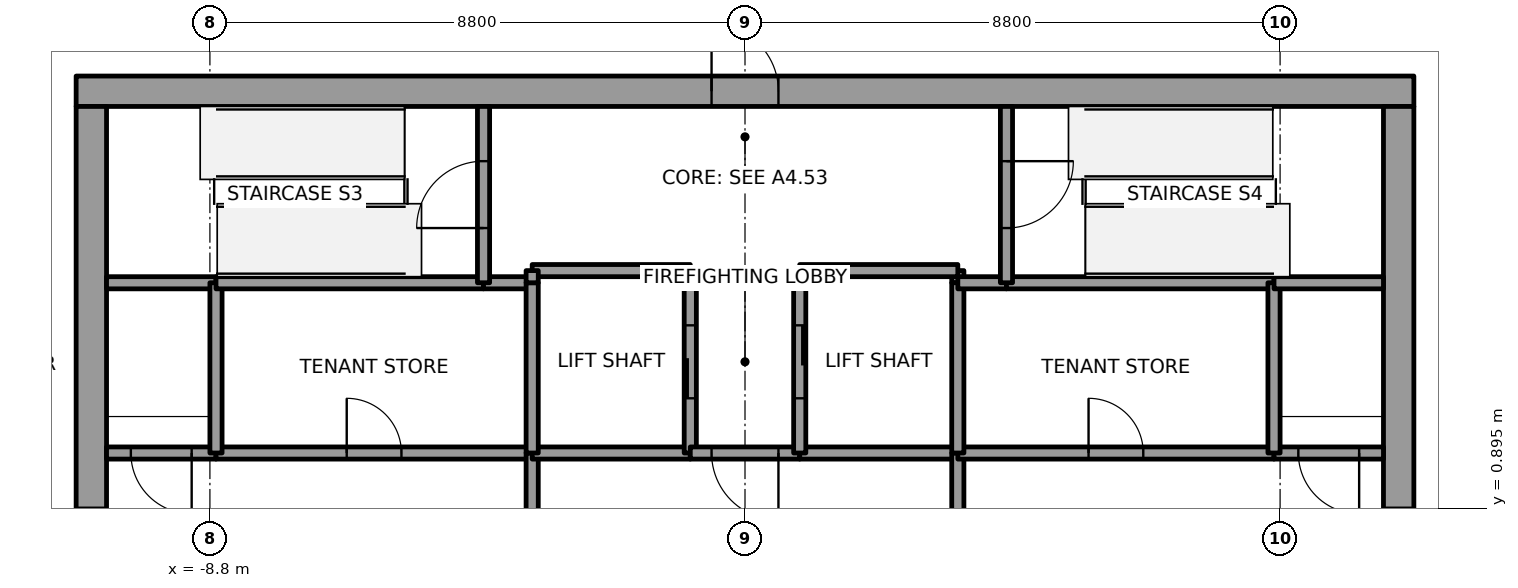
"""IFC4 building model, lengths in metres.
Left out: names, types, materials, properties, quantities, classifications, styles, units other than length and angle.
Written with IfcOpenShell. Run it as: python <this file> out.ifc"""

import sys

from ifc_helpers import new_model, si_unit, direction, frame, frame_2d, origin, place, context, subcontext, project, spatial, rectangle, extrude, element, fill, save


model = new_model("IFC4")
c1 = context("Model", 3, precision=1e-05, world=origin(), true_north=direction((0.0, 1.0)))
c2 = subcontext(c1, "Body", "Model", "MODEL_VIEW")
j1 = project(units=[si_unit("LENGTHUNIT", "METRE"), si_unit("PLANEANGLEUNIT", "RADIAN")], contexts=[c1])
p1 = place(None, origin())
s1 = spatial("IfcSite", under=j1, at=p1, CompositionType="ELEMENT")
p2 = place(p1, origin())
s2 = spatial("IfcBuilding", under=s1, at=p2, CompositionType="ELEMENT")
p3 = place(p2, frame((0.0, 0.0, 231.0)))
s3 = spatial("IfcBuildingStorey", under=s2, at=p3, CompositionType="ELEMENT", Elevation=231.0)
p4 = place(p3, frame((-11.0, 7.75, 0.0), z_axis=(0.0, 0.0, 1.0), x_axis=(1.0, 0.0, 0.0)))
e1 = element("IfcWall", 1, at=p4, inside=s3, PredefinedType="SHEAR", context=c2, shape_type="SweptSolid", body=[
    extrude(rectangle(XDim=22.0, YDim=0.5, at=frame_2d((11.0, 0.0))), origin(), (0.0, 0.0, 1.0), 4.0),
])
p5 = place(p4, frame((10.45, 0.0, 0.0)))
e2 = element("IfcOpeningElement", 2, at=p5, cuts=e1, PredefinedType="OPENING", context=c2, shape_type="SweptSolid", body=[
    extrude(rectangle(XDim=1.1, YDim=2.1, at=frame_2d((0.55, 1.05))), frame((0.0, 0.25, 0.0), z_axis=(0.0, -1.0, 0.0), x_axis=(1.0, 0.0, 0.0)), (0.0, 0.0, 1.0), 0.5),
])
p6 = place(p3, frame((-10.75, -7.5, 0.0), z_axis=(0.0, 0.0, 1.0), x_axis=(0.0, 1.0, 0.0)))
e3 = element("IfcWall", 3, at=p6, inside=s3, PredefinedType="SHEAR", context=c2, shape_type="SweptSolid", body=[
    extrude(rectangle(XDim=15.0, YDim=0.5, at=frame_2d((7.5, 0.0))), origin(), (0.0, 0.0, 1.0), 4.0),
])
p7 = place(p6, frame((6.6, 0.0, 0.0)))
e4 = element("IfcOpeningElement", 4, at=p7, cuts=e3, PredefinedType="OPENING", context=c2, shape_type="SweptSolid", body=[
    extrude(rectangle(XDim=1.8, YDim=2.1, at=frame_2d((0.9, 1.05))), frame((0.0, 0.25, 0.0), z_axis=(0.0, -1.0, 0.0), x_axis=(1.0, 0.0, 0.0)), (0.0, 0.0, 1.0), 0.5),
])
p8 = place(p3, frame((10.75, -7.5, 0.0), z_axis=(0.0, 0.0, 1.0), x_axis=(0.0, 1.0, 0.0)))
e5 = element("IfcWall", 5, at=p8, inside=s3, PredefinedType="SHEAR", context=c2, shape_type="SweptSolid", body=[
    extrude(rectangle(XDim=15.0, YDim=0.5, at=frame_2d((7.5, 0.0))), origin(), (0.0, 0.0, 1.0), 4.0),
])
p9 = place(p8, frame((6.6, 0.0, 0.0)))
e6 = element("IfcOpeningElement", 6, at=p9, cuts=e5, PredefinedType="OPENING", context=c2, shape_type="SweptSolid", body=[
    extrude(rectangle(XDim=1.8, YDim=2.1, at=frame_2d((0.9, 1.05))), frame((0.0, 0.25, 0.0), z_axis=(0.0, -1.0, 0.0), x_axis=(1.0, 0.0, 0.0)), (0.0, 0.0, 1.0), 0.5),
])
p10 = place(p3, frame((-8.7, 1.8, 0.0), z_axis=(0.0, 0.0, 1.0), x_axis=(-1.0, 0.0, 0.0)))
e7 = element("IfcWall", 7, at=p10, inside=s3, PredefinedType="SOLIDWALL", context=c2, shape_type="SweptSolid", body=[
    extrude(rectangle(XDim=1.8, YDim=0.2, at=frame_2d((0.9, 0.0))), origin(), (0.0, 0.0, 1.0), 3.85),
])
p11 = place(p10, frame((0.4, 0.0, 0.0)))
e8 = element("IfcOpeningElement", 8, at=p11, cuts=e7, PredefinedType="OPENING", context=c2, shape_type="SweptSolid", body=[
    extrude(rectangle(XDim=1.0, YDim=2.1, at=frame_2d((0.5, 1.05))), frame((0.0, 0.1, 0.0), z_axis=(0.0, -1.0, 0.0), x_axis=(1.0, 0.0, 0.0)), (0.0, 0.0, 1.0), 0.2),
])
p12 = place(p3, frame((-8.7, 4.6, 0.0), z_axis=(0.0, 0.0, 1.0), x_axis=(-1.0, 0.0, 0.0)))
e9 = element("IfcWall", 9, at=p12, inside=s3, PredefinedType="SOLIDWALL", context=c2, shape_type="SweptSolid", body=[
    extrude(rectangle(XDim=1.8, YDim=0.2, at=frame_2d((0.9, 0.0))), origin(), (0.0, 0.0, 1.0), 3.85),
])
p13 = place(p3, frame((-8.7, 1.8, 0.0), z_axis=(0.0, 0.0, 1.0), x_axis=(1.0, 0.0, 0.0)))
e10 = element("IfcWall", 10, at=p13, inside=s3, PredefinedType="SOLIDWALL", context=c2, shape_type="SweptSolid", body=[
    extrude(rectangle(XDim=5.2, YDim=0.2, at=frame_2d((2.6, 0.0))), origin(), (0.0, 0.0, 1.0), 3.85),
])
p14 = place(p13, frame((2.15, 0.0, 0.0)))
e11 = element("IfcOpeningElement", 11, at=p14, cuts=e10, PredefinedType="OPENING", context=c2, shape_type="SweptSolid", body=[
    extrude(rectangle(XDim=0.9, YDim=2.1, at=frame_2d((0.45, 1.05))), frame((0.0, 0.1, 0.0), z_axis=(0.0, -1.0, 0.0), x_axis=(1.0, 0.0, 0.0)), (0.0, 0.0, 1.0), 0.2),
])
p15 = place(p3, frame((-8.7, 4.6, 0.0), z_axis=(0.0, 0.0, 1.0), x_axis=(0.0, -1.0, 0.0)))
e12 = element("IfcWall", 12, at=p15, inside=s3, PredefinedType="SOLIDWALL", context=c2, shape_type="SweptSolid", body=[
    extrude(rectangle(XDim=2.8, YDim=0.2, at=frame_2d((1.4, 0.0))), origin(), (0.0, 0.0, 1.0), 3.85),
])
p16 = place(p3, frame((-4.3, 4.6, 0.0), z_axis=(0.0, 0.0, 1.0), x_axis=(-1.0, 0.0, 0.0)))
e13 = element("IfcWall", 13, at=p16, inside=s3, PredefinedType="SOLIDWALL", context=c2, shape_type="SweptSolid", body=[
    extrude(rectangle(XDim=4.4, YDim=0.2, at=frame_2d((2.2, 0.0))), origin(), (0.0, 0.0, 1.0), 3.85),
])
p17 = place(p3, frame((-3.5, 4.6, 0.0), z_axis=(0.0, 0.0, 1.0), x_axis=(-1.0, 0.0, 0.0)))
e14 = element("IfcWall", 14, at=p17, inside=s3, PredefinedType="SOLIDWALL", context=c2, shape_type="SweptSolid", body=[
    extrude(rectangle(XDim=0.8, YDim=0.2, at=frame_2d((0.4, 0.0))), origin(), (0.0, 0.0, 1.0), 3.85),
])
p18 = place(p3, frame((-4.3, 4.6, 0.0), z_axis=(0.0, 0.0, 1.0), x_axis=(0.0, 1.0, 0.0)))
e15 = element("IfcWall", 15, at=p18, inside=s3, PredefinedType="SOLIDWALL", context=c2, shape_type="SweptSolid", body=[
    extrude(rectangle(XDim=2.9, YDim=0.2, at=frame_2d((1.45, 0.0))), origin(), (0.0, 0.0, 1.0), 3.85),
])
p19 = place(p18, frame((0.9, 0.0, 0.0)))
e16 = element("IfcOpeningElement", 16, at=p19, cuts=e15, PredefinedType="OPENING", context=c2, shape_type="SweptSolid", body=[
    extrude(rectangle(XDim=1.1, YDim=2.1, at=frame_2d((0.55, 1.05))), frame((0.0, 0.1, 0.0), z_axis=(0.0, -1.0, 0.0), x_axis=(1.0, 0.0, 0.0)), (0.0, 0.0, 1.0), 0.2),
])
p20 = place(p3, frame((-3.5, 1.8, 0.0), z_axis=(0.0, 0.0, 1.0), x_axis=(0.0, -1.0, 0.0)))
e17 = element("IfcWall", 17, at=p20, inside=s3, PredefinedType="SOLIDWALL", context=c2, shape_type="SweptSolid", body=[
    extrude(rectangle(XDim=3.6, YDim=0.2, at=frame_2d((1.8, 0.0))), origin(), (0.0, 0.0, 1.0), 3.85),
])
p21 = place(p20, frame((1.05, 0.0, 0.0)))
e18 = element("IfcOpeningElement", 18, at=p21, cuts=e17, PredefinedType="OPENING", context=c2, shape_type="SweptSolid", body=[
    extrude(rectangle(XDim=1.5, YDim=2.1, at=frame_2d((0.75, 1.05))), frame((0.0, 0.1, 0.0), z_axis=(0.0, -1.0, 0.0), x_axis=(1.0, 0.0, 0.0)), (0.0, 0.0, 1.0), 0.2),
])
p22 = place(p3, frame((-0.9, 1.8, 0.0), z_axis=(0.0, 0.0, 1.0), x_axis=(-1.0, 0.0, 0.0)))
e19 = element("IfcWall", 19, at=p22, inside=s3, PredefinedType="SOLIDWALL", context=c2, shape_type="SweptSolid", body=[
    extrude(rectangle(XDim=2.6, YDim=0.2, at=frame_2d((1.3, 0.0))), origin(), (0.0, 0.0, 1.0), 3.85),
])
p23 = place(p3, frame((-3.5, 1.8, 0.0), z_axis=(0.0, 0.0, 1.0), x_axis=(0.0, 1.0, 0.0)))
e20 = element("IfcWall", 20, at=p23, inside=s3, PredefinedType="SOLIDWALL", context=c2, shape_type="SweptSolid", body=[
    extrude(rectangle(XDim=2.8, YDim=0.2, at=frame_2d((1.4, 0.0))), origin(), (0.0, 0.0, 1.0), 3.85),
])
p24 = place(p3, frame((-0.9, 1.8, 0.0), z_axis=(0.0, 0.0, 1.0), x_axis=(0.0, 1.0, 0.0)))
e21 = element("IfcWall", 21, at=p24, inside=s3, PredefinedType="SOLIDWALL", context=c2, shape_type="SweptSolid", body=[
    extrude(rectangle(XDim=3.0, YDim=0.2, at=frame_2d((1.5, 0.0))), origin(), (0.0, 0.0, 1.0), 3.85),
])
p25 = place(p24, frame((0.9, 0.0, 0.0)))
e22 = element("IfcOpeningElement", 22, at=p25, cuts=e21, PredefinedType="OPENING", context=c2, shape_type="SweptSolid", body=[
    extrude(rectangle(XDim=1.2, YDim=2.1, at=frame_2d((0.6, 1.05))), frame((0.0, 0.1, 0.0), z_axis=(0.0, -1.0, 0.0), x_axis=(1.0, 0.0, 0.0)), (0.0, 0.0, 1.0), 0.2),
])
p26 = place(p3, frame((-0.9, 4.8, 0.0), z_axis=(0.0, 0.0, 1.0), x_axis=(-1.0, 0.0, 0.0)))
e23 = element("IfcWall", 23, at=p26, inside=s3, PredefinedType="SOLIDWALL", context=c2, shape_type="SweptSolid", body=[
    extrude(rectangle(XDim=2.6, YDim=0.2, at=frame_2d((1.3, 0.0))), origin(), (0.0, 0.0, 1.0), 3.85),
])
p27 = place(p3, frame((-3.5, 4.8, 0.0), z_axis=(0.0, 0.0, 1.0), x_axis=(0.0, -1.0, 0.0)))
e24 = element("IfcWall", 24, at=p27, inside=s3, PredefinedType="SOLIDWALL", context=c2, shape_type="SweptSolid", body=[
    extrude(rectangle(XDim=0.2, YDim=0.2, at=frame_2d((0.1, 0.0))), origin(), (0.0, 0.0, 1.0), 3.85),
])
p28 = place(p3, frame((0.9, 1.8, 0.0), z_axis=(0.0, 0.0, 1.0), x_axis=(-1.0, 0.0, 0.0)))
e25 = element("IfcWall", 25, at=p28, inside=s3, PredefinedType="SOLIDWALL", context=c2, shape_type="SweptSolid", body=[
    extrude(rectangle(XDim=1.8, YDim=0.2, at=frame_2d((0.9, 0.0))), origin(), (0.0, 0.0, 1.0), 3.85),
])
p29 = place(p28, frame((0.35, 0.0, 0.0)))
e26 = element("IfcOpeningElement", 26, at=p29, cuts=e25, PredefinedType="OPENING", context=c2, shape_type="SweptSolid", body=[
    extrude(rectangle(XDim=1.1, YDim=2.1, at=frame_2d((0.55, 1.05))), frame((0.0, 0.1, 0.0), z_axis=(0.0, -1.0, 0.0), x_axis=(1.0, 0.0, 0.0)), (0.0, 0.0, 1.0), 0.2),
])
p30 = place(p3, frame((3.5, 1.8, 0.0), z_axis=(0.0, 0.0, 1.0), x_axis=(-1.0, 0.0, 0.0)))
e27 = element("IfcWall", 27, at=p30, inside=s3, PredefinedType="SOLIDWALL", context=c2, shape_type="SweptSolid", body=[
    extrude(rectangle(XDim=2.6, YDim=0.2, at=frame_2d((1.3, 0.0))), origin(), (0.0, 0.0, 1.0), 3.85),
])
p31 = place(p3, frame((3.5, 4.6, 0.0), z_axis=(0.0, 0.0, 1.0), x_axis=(0.0, 1.0, 0.0)))
e28 = element("IfcWall", 28, at=p31, inside=s3, PredefinedType="SOLIDWALL", context=c2, shape_type="SweptSolid", body=[
    extrude(rectangle(XDim=0.2, YDim=0.2, at=frame_2d((0.1, 0.0))), origin(), (0.0, 0.0, 1.0), 3.85),
])
p32 = place(p3, frame((3.5, 4.8, 0.0), z_axis=(0.0, 0.0, 1.0), x_axis=(-1.0, 0.0, 0.0)))
e29 = element("IfcWall", 29, at=p32, inside=s3, PredefinedType="SOLIDWALL", context=c2, shape_type="SweptSolid", body=[
    extrude(rectangle(XDim=2.6, YDim=0.2, at=frame_2d((1.3, 0.0))), origin(), (0.0, 0.0, 1.0), 3.85),
])
p33 = place(p3, frame((0.9, 4.8, 0.0), z_axis=(0.0, 0.0, 1.0), x_axis=(0.0, -1.0, 0.0)))
e30 = element("IfcWall", 30, at=p33, inside=s3, PredefinedType="SOLIDWALL", context=c2, shape_type="SweptSolid", body=[
    extrude(rectangle(XDim=3.0, YDim=0.2, at=frame_2d((1.5, 0.0))), origin(), (0.0, 0.0, 1.0), 3.85),
])
p34 = place(p33, frame((0.9, 0.0, 0.0)))
e31 = element("IfcOpeningElement", 31, at=p34, cuts=e30, PredefinedType="OPENING", context=c2, shape_type="SweptSolid", body=[
    extrude(rectangle(XDim=1.2, YDim=2.1, at=frame_2d((0.6, 1.05))), frame((0.0, 0.1, 0.0), z_axis=(0.0, -1.0, 0.0), x_axis=(1.0, 0.0, 0.0)), (0.0, 0.0, 1.0), 0.2),
])
p35 = place(p3, frame((3.5, -1.8, 0.0), z_axis=(0.0, 0.0, 1.0), x_axis=(0.0, 1.0, 0.0)))
e32 = element("IfcWall", 32, at=p35, inside=s3, PredefinedType="SOLIDWALL", context=c2, shape_type="SweptSolid", body=[
    extrude(rectangle(XDim=3.6, YDim=0.2, at=frame_2d((1.8, 0.0))), origin(), (0.0, 0.0, 1.0), 3.85),
])
p36 = place(p35, frame((1.05, 0.0, 0.0)))
e33 = element("IfcOpeningElement", 33, at=p36, cuts=e32, PredefinedType="OPENING", context=c2, shape_type="SweptSolid", body=[
    extrude(rectangle(XDim=1.5, YDim=2.1, at=frame_2d((0.75, 1.05))), frame((0.0, 0.1, 0.0), z_axis=(0.0, -1.0, 0.0), x_axis=(1.0, 0.0, 0.0)), (0.0, 0.0, 1.0), 0.2),
])
p37 = place(p3, frame((3.5, 1.8, 0.0), z_axis=(0.0, 0.0, 1.0), x_axis=(1.0, 0.0, 0.0)))
e34 = element("IfcWall", 34, at=p37, inside=s3, PredefinedType="SOLIDWALL", context=c2, shape_type="SweptSolid", body=[
    extrude(rectangle(XDim=5.2, YDim=0.2, at=frame_2d((2.6, 0.0))), origin(), (0.0, 0.0, 1.0), 3.85),
])
p38 = place(p37, frame((2.15, 0.0, 0.0)))
e35 = element("IfcOpeningElement", 35, at=p38, cuts=e34, PredefinedType="OPENING", context=c2, shape_type="SweptSolid", body=[
    extrude(rectangle(XDim=0.9, YDim=2.1, at=frame_2d((0.45, 1.05))), frame((0.0, 0.1, 0.0), z_axis=(0.0, -1.0, 0.0), x_axis=(1.0, 0.0, 0.0)), (0.0, 0.0, 1.0), 0.2),
])
p39 = place(p3, frame((3.5, 4.6, 0.0), z_axis=(0.0, 0.0, 1.0), x_axis=(0.0, -1.0, 0.0)))
e36 = element("IfcWall", 36, at=p39, inside=s3, PredefinedType="SOLIDWALL", context=c2, shape_type="SweptSolid", body=[
    extrude(rectangle(XDim=2.8, YDim=0.2, at=frame_2d((1.4, 0.0))), origin(), (0.0, 0.0, 1.0), 3.85),
])
p40 = place(p3, frame((4.3, 4.6, 0.0), z_axis=(0.0, 0.0, 1.0), x_axis=(-1.0, 0.0, 0.0)))
e37 = element("IfcWall", 37, at=p40, inside=s3, PredefinedType="SOLIDWALL", context=c2, shape_type="SweptSolid", body=[
    extrude(rectangle(XDim=0.8, YDim=0.2, at=frame_2d((0.4, 0.0))), origin(), (0.0, 0.0, 1.0), 3.85),
])
p41 = place(p3, frame((8.7, 4.6, 0.0), z_axis=(0.0, 0.0, 1.0), x_axis=(-1.0, 0.0, 0.0)))
e38 = element("IfcWall", 38, at=p41, inside=s3, PredefinedType="SOLIDWALL", context=c2, shape_type="SweptSolid", body=[
    extrude(rectangle(XDim=4.4, YDim=0.2, at=frame_2d((2.2, 0.0))), origin(), (0.0, 0.0, 1.0), 3.85),
])
p42 = place(p3, frame((4.3, 7.5, 0.0), z_axis=(0.0, 0.0, 1.0), x_axis=(0.0, -1.0, 0.0)))
e39 = element("IfcWall", 39, at=p42, inside=s3, PredefinedType="SOLIDWALL", context=c2, shape_type="SweptSolid", body=[
    extrude(rectangle(XDim=2.9, YDim=0.2, at=frame_2d((1.45, 0.0))), origin(), (0.0, 0.0, 1.0), 3.85),
])
p43 = place(p42, frame((0.9, 0.0, 0.0)))
e40 = element("IfcOpeningElement", 40, at=p43, cuts=e39, PredefinedType="OPENING", context=c2, shape_type="SweptSolid", body=[
    extrude(rectangle(XDim=1.1, YDim=2.1, at=frame_2d((0.55, 1.05))), frame((0.0, 0.1, 0.0), z_axis=(0.0, -1.0, 0.0), x_axis=(1.0, 0.0, 0.0)), (0.0, 0.0, 1.0), 0.2),
])
p44 = place(p3, frame((10.5, 1.8, 0.0), z_axis=(0.0, 0.0, 1.0), x_axis=(-1.0, 0.0, 0.0)))
e41 = element("IfcWall", 41, at=p44, inside=s3, PredefinedType="SOLIDWALL", context=c2, shape_type="SweptSolid", body=[
    extrude(rectangle(XDim=1.8, YDim=0.2, at=frame_2d((0.9, 0.0))), origin(), (0.0, 0.0, 1.0), 3.85),
])
p45 = place(p44, frame((0.4, 0.0, 0.0)))
e42 = element("IfcOpeningElement", 42, at=p45, cuts=e41, PredefinedType="OPENING", context=c2, shape_type="SweptSolid", body=[
    extrude(rectangle(XDim=1.0, YDim=2.1, at=frame_2d((0.5, 1.05))), frame((0.0, 0.1, 0.0), z_axis=(0.0, -1.0, 0.0), x_axis=(1.0, 0.0, 0.0)), (0.0, 0.0, 1.0), 0.2),
])
p46 = place(p3, frame((8.7, 1.8, 0.0), z_axis=(0.0, 0.0, 1.0), x_axis=(0.0, 1.0, 0.0)))
e43 = element("IfcWall", 43, at=p46, inside=s3, PredefinedType="SOLIDWALL", context=c2, shape_type="SweptSolid", body=[
    extrude(rectangle(XDim=2.8, YDim=0.2, at=frame_2d((1.4, 0.0))), origin(), (0.0, 0.0, 1.0), 3.85),
])
p47 = place(p3, frame((10.5, 4.6, 0.0), z_axis=(0.0, 0.0, 1.0), x_axis=(-1.0, 0.0, 0.0)))
e44 = element("IfcWall", 44, at=p47, inside=s3, PredefinedType="SOLIDWALL", context=c2, shape_type="SweptSolid", body=[
    extrude(rectangle(XDim=1.8, YDim=0.2, at=frame_2d((0.9, 0.0))), origin(), (0.0, 0.0, 1.0), 3.85),
])
p48 = place(p25, origin())
e45 = element("IfcDoor", 45, at=p48, inside=s3, OperationType="SLIDING_TO_LEFT", PredefinedType="DOOR", context=c2, shape_type="SweptSolid", body=[
    extrude(rectangle(XDim=1.2, YDim=2.1, at=frame_2d((0.6, 1.05))), frame((0.0, 0.025, 0.0), z_axis=(0.0, -1.0, 0.0), x_axis=(1.0, 0.0, 0.0)), (0.0, 0.0, 1.0), 0.05),
])
fill(e22, e45)
p49 = place(p34, origin())
e46 = element("IfcDoor", 46, at=p49, inside=s3, OperationType="SLIDING_TO_LEFT", PredefinedType="DOOR", context=c2, shape_type="SweptSolid", body=[
    extrude(rectangle(XDim=1.2, YDim=2.1, at=frame_2d((0.6, 1.05))), frame((0.0, 0.025, 0.0), z_axis=(0.0, -1.0, 0.0), x_axis=(1.0, 0.0, 0.0)), (0.0, 0.0, 1.0), 0.05),
])
fill(e31, e46)
p50 = place(p29, origin())
e47 = element("IfcDoor", 47, at=p50, inside=s3, OperationType="SINGLE_SWING_RIGHT", PredefinedType="DOOR", context=c2, shape_type="SweptSolid", body=[
    extrude(rectangle(XDim=1.1, YDim=2.1, at=frame_2d((0.55, 1.05))), frame((0.0, 0.025, 0.0), z_axis=(0.0, -1.0, 0.0), x_axis=(1.0, 0.0, 0.0)), (0.0, 0.0, 1.0), 0.05),
])
fill(e26, e47)
p51 = place(p11, origin())
e48 = element("IfcDoor", 48, at=p51, inside=s3, OperationType="SINGLE_SWING_LEFT", PredefinedType="DOOR", context=c2, shape_type="SweptSolid", body=[
    extrude(rectangle(XDim=1.0, YDim=2.1, at=frame_2d((0.5, 1.05))), frame((0.0, 0.025, 0.0), z_axis=(0.0, -1.0, 0.0), x_axis=(1.0, 0.0, 0.0)), (0.0, 0.0, 1.0), 0.05),
])
fill(e8, e48)
p52 = place(p45, origin())
e49 = element("IfcDoor", 49, at=p52, inside=s3, OperationType="SINGLE_SWING_LEFT", PredefinedType="DOOR", context=c2, shape_type="SweptSolid", body=[
    extrude(rectangle(XDim=1.0, YDim=2.1, at=frame_2d((0.5, 1.05))), frame((0.0, 0.025, 0.0), z_axis=(0.0, -1.0, 0.0), x_axis=(1.0, 0.0, 0.0)), (0.0, 0.0, 1.0), 0.05),
])
fill(e42, e49)
p53 = place(p19, origin())
e50 = element("IfcDoor", 50, at=p53, inside=s3, OperationType="SINGLE_SWING_LEFT", PredefinedType="DOOR", context=c2, shape_type="SweptSolid", body=[
    extrude(rectangle(XDim=1.1, YDim=2.1, at=frame_2d((0.55, 1.05))), frame((0.0, 0.025, 0.0), z_axis=(0.0, -1.0, 0.0), x_axis=(1.0, 0.0, 0.0)), (0.0, 0.0, 1.0), 0.05),
])
fill(e16, e50)
p54 = place(p43, origin())
e51 = element("IfcDoor", 51, at=p54, inside=s3, OperationType="SINGLE_SWING_RIGHT", PredefinedType="DOOR", context=c2, shape_type="SweptSolid", body=[
    extrude(rectangle(XDim=1.1, YDim=2.1, at=frame_2d((0.55, 1.05))), frame((0.0, 0.025, 0.0), z_axis=(0.0, -1.0, 0.0), x_axis=(1.0, 0.0, 0.0)), (0.0, 0.0, 1.0), 0.05),
])
fill(e40, e51)
p55 = place(p38, origin())
e52 = element("IfcDoor", 52, at=p55, inside=s3, OperationType="SINGLE_SWING_RIGHT", PredefinedType="DOOR", context=c2, shape_type="SweptSolid", body=[
    extrude(rectangle(XDim=0.9, YDim=2.1, at=frame_2d((0.45, 1.05))), frame((0.0, 0.025, 0.0), z_axis=(0.0, -1.0, 0.0), x_axis=(1.0, 0.0, 0.0)), (0.0, 0.0, 1.0), 0.05),
])
fill(e35, e52)
p56 = place(p14, origin())
e53 = element("IfcDoor", 53, at=p56, inside=s3, OperationType="SINGLE_SWING_LEFT", PredefinedType="DOOR", context=c2, shape_type="SweptSolid", body=[
    extrude(rectangle(XDim=0.9, YDim=2.1, at=frame_2d((0.45, 1.05))), frame((0.0, 0.025, 0.0), z_axis=(0.0, -1.0, 0.0), x_axis=(1.0, 0.0, 0.0)), (0.0, 0.0, 1.0), 0.05),
])
fill(e11, e53)
p57 = place(p7, origin())
e54 = element("IfcDoor", 54, at=p57, inside=s3, OperationType="DOUBLE_DOOR_SINGLE_SWING", PredefinedType="DOOR", context=c2, shape_type="SweptSolid", body=[
    extrude(rectangle(XDim=1.8, YDim=2.1, at=frame_2d((0.9, 1.05))), frame((0.0, 0.025, 0.0), z_axis=(0.0, -1.0, 0.0), x_axis=(1.0, 0.0, 0.0)), (0.0, 0.0, 1.0), 0.05),
])
fill(e4, e54)
p58 = place(p9, origin())
e55 = element("IfcDoor", 55, at=p58, inside=s3, OperationType="DOUBLE_DOOR_SINGLE_SWING", PredefinedType="DOOR", context=c2, shape_type="SweptSolid", body=[
    extrude(rectangle(XDim=1.8, YDim=2.1, at=frame_2d((0.9, 1.05))), frame((0.0, 0.025, 0.0), z_axis=(0.0, -1.0, 0.0), x_axis=(1.0, 0.0, 0.0)), (0.0, 0.0, 1.0), 0.05),
])
fill(e6, e55)
p59 = place(p5, origin())
e56 = element("IfcDoor", 56, at=p59, inside=s3, OperationType="SINGLE_SWING_LEFT", PredefinedType="DOOR", context=c2, shape_type="SweptSolid", body=[
    extrude(rectangle(XDim=1.1, YDim=2.1, at=frame_2d((0.55, 1.05))), frame((0.0, 0.025, 0.0), z_axis=(0.0, -1.0, 0.0), x_axis=(1.0, 0.0, 0.0)), (0.0, 0.0, 1.0), 0.05),
])
fill(e2, e56)
save(model, sys.argv[1])
